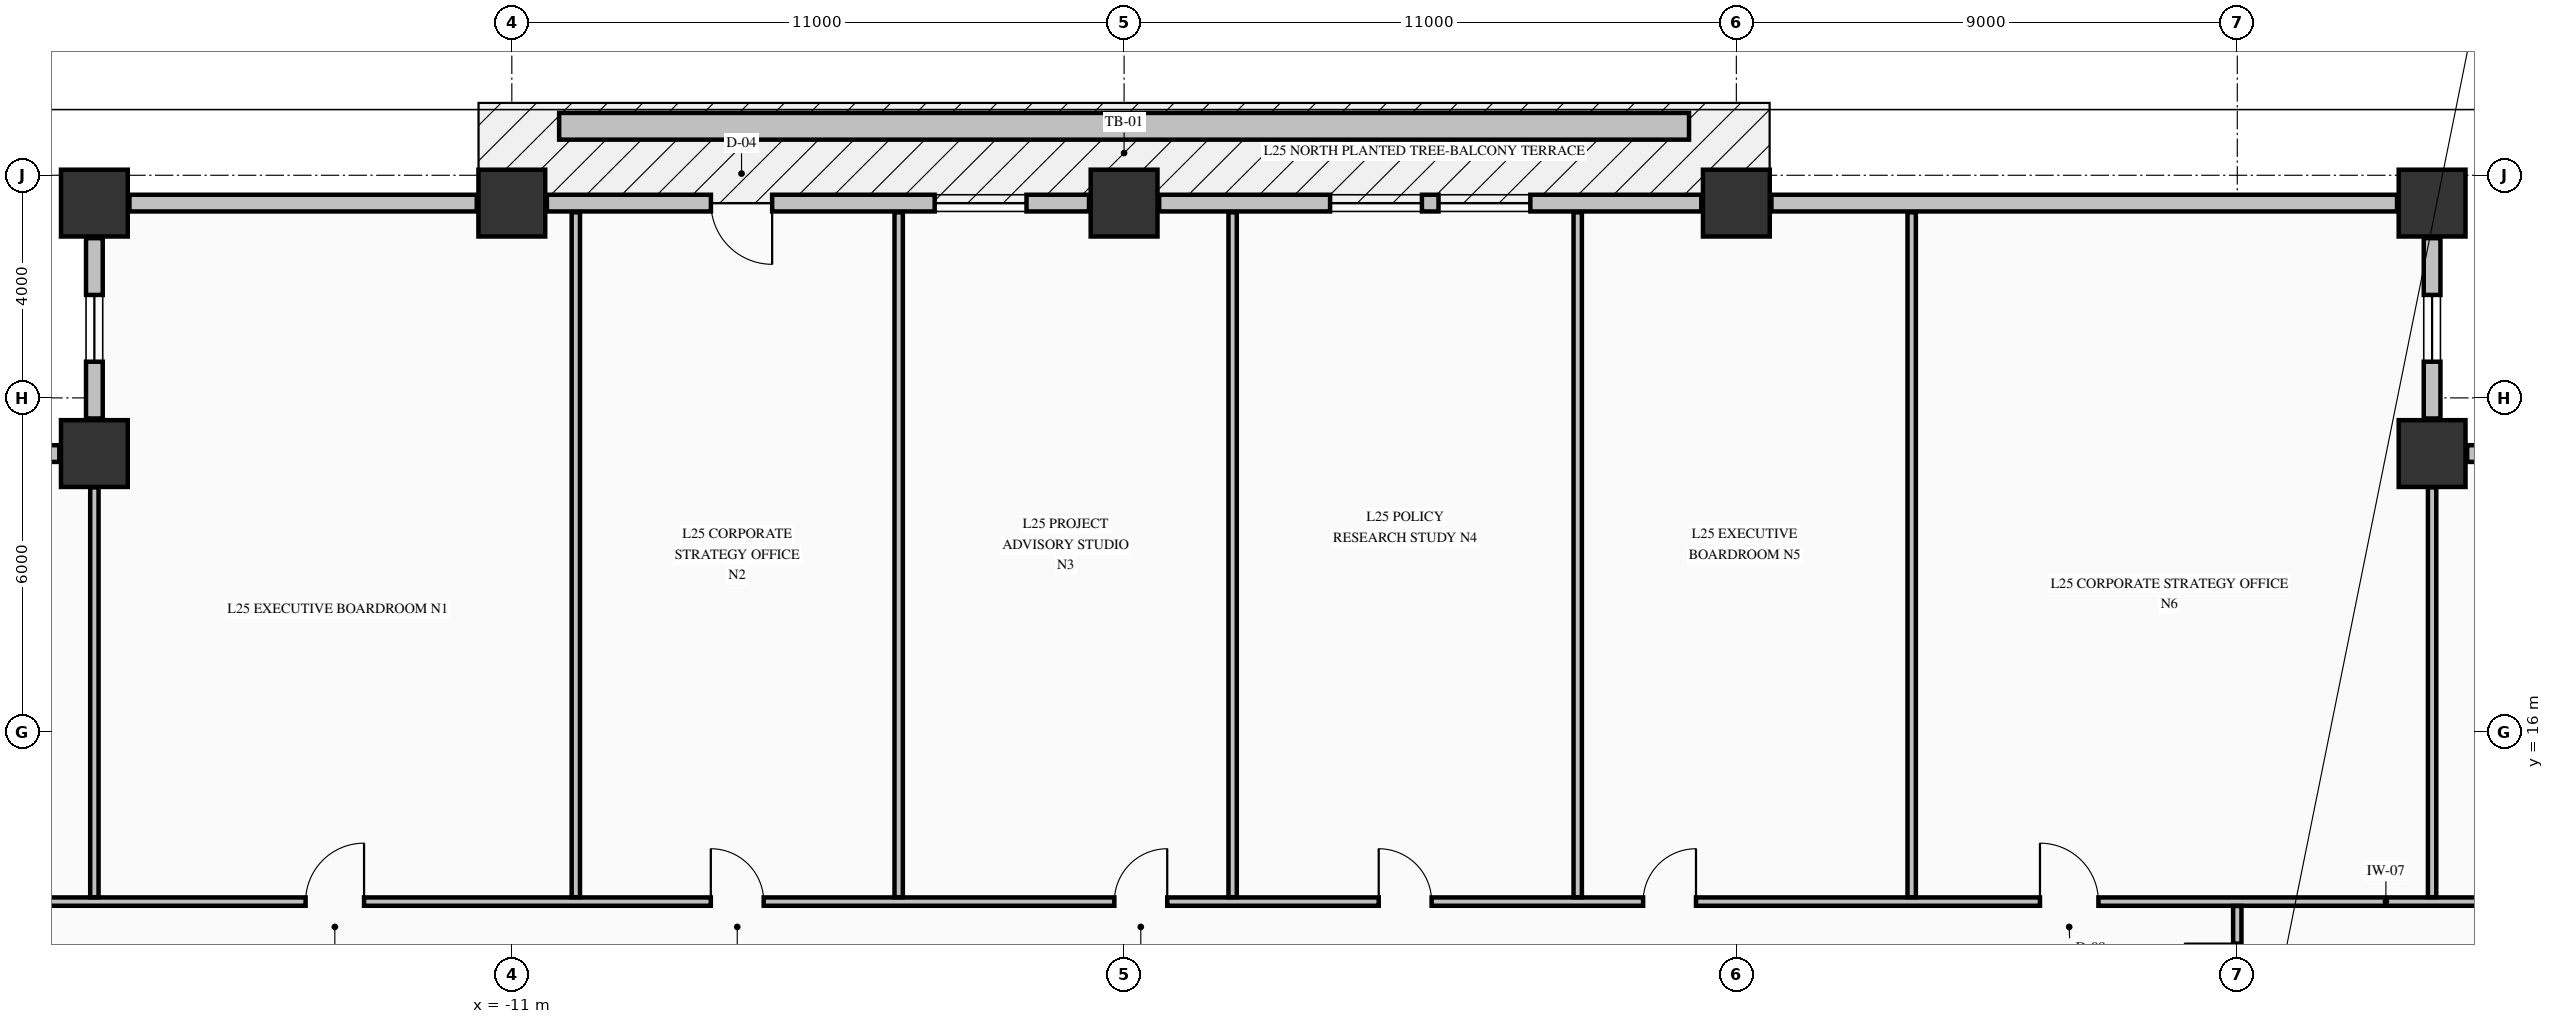
"""IFC4 building model, lengths in metres.
Left out: names, types, materials, properties, quantities, classifications, styles, units other than length and angle.
Written with IfcOpenShell. Run it as: python <this file> out.ifc"""

import sys

from ifc_helpers import new_model, si_unit, direction, frame, frame_2d, origin, origin_2d, place, context, subcontext, project, spatial, rectangle, extrude, element, fill, save


model = new_model("IFC4")
c1 = context("Model", 3, precision=1e-05, world=origin(), true_north=direction((0.0, 1.0)))
c2 = subcontext(c1, "Body", "Model", "MODEL_VIEW")
j1 = project(units=[si_unit("LENGTHUNIT", "METRE"), si_unit("PLANEANGLEUNIT", "RADIAN")], contexts=[c1])
p1 = place(None, origin())
s1 = spatial("IfcSite", under=j1, at=p1, CompositionType="ELEMENT")
p2 = place(p1, origin())
s2 = spatial("IfcBuilding", under=s1, at=p2, CompositionType="ELEMENT")
p3 = place(p2, frame((0.0, 0.0, 102.07)))
s3 = spatial("IfcBuildingStorey", under=s2, at=p3, CompositionType="ELEMENT", Elevation=102.07)
for number, where, z_axis, x_axis in (
    (1, (-18.5, 25.5, -0.25), (0.0, 0.0, 1.0), (1.0, 0.0, 0.0)),
    (2, (-11.0, 25.5, -0.25), (0.0, 0.0, 1.0), (1.0, 0.0, 0.0)),
    (3, (0.0, 25.5, -0.25), (0.0, 0.0, 1.0), (1.0, 0.0, 0.0)),
    (4, (11.0, 25.5, -0.25), (0.0, 0.0, 1.0), (1.0, 0.0, 0.0)),
    (5, (23.5, 25.5, -0.25), (0.0, 0.0, 1.0), (1.0, 0.0, 0.0)),
    (6, (23.5, 21.0, -0.25), (0.0, 0.0, 1.0), (1.0, 0.0, 0.0)),
    (7, (-18.5, 21.0, -0.25), (0.0, 0.0, 1.0), (1.0, 0.0, 0.0)),
):
    element("IfcColumn", number, at=place(p3, frame(where, z_axis=z_axis, x_axis=x_axis)), inside=s3, PredefinedType="COLUMN", context=c2, shape_type="SweptSolid", body=[
        extrude(rectangle(XDim=1.2, YDim=1.2, at=origin_2d()), origin(), (0.0, 0.0, 1.0), 3.57),
    ])
p4 = place(p3, frame((27.37, 21.0, 0.0), z_axis=(0.0, 0.0, 1.0), x_axis=(-1.0, 0.0, 0.0)))
e8 = element("IfcWall", 8, at=p4, inside=s3, PredefinedType="STANDARD", context=c2, shape_type="SweptSolid", body=[
    extrude(rectangle(XDim=3.24, YDim=0.3, at=frame_2d((1.62, 0.0))), origin(), (0.0, 0.0, 1.0), 2.712),
])
p5 = place(p4, frame((1.02, 0.0, 0.82)))
e9 = element("IfcOpeningElement", 9, at=p5, cuts=e8, PredefinedType="OPENING", context=c2, shape_type="SweptSolid", body=[
    extrude(rectangle(XDim=1.2, YDim=1.65, at=frame_2d((0.6, 0.825))), frame((0.0, 0.16, 0.0), z_axis=(0.0, -1.0, 0.0), x_axis=(1.0, 0.0, 0.0)), (0.0, 0.0, 1.0), 0.32),
])
p6 = place(p3, frame((23.5, 21.63, 0.0), z_axis=(0.0, 0.0, 1.0), x_axis=(0.0, 1.0, 0.0)))
e10 = element("IfcWall", 10, at=p6, inside=s3, PredefinedType="STANDARD", context=c2, shape_type="SweptSolid", body=[
    extrude(rectangle(XDim=3.24, YDim=0.3, at=frame_2d((1.62, 0.0))), origin(), (0.0, 0.0, 1.0), 2.712),
])
p7 = place(p6, frame((1.02, 0.0, 0.82)))
e11 = element("IfcOpeningElement", 11, at=p7, cuts=e10, PredefinedType="OPENING", context=c2, shape_type="SweptSolid", body=[
    extrude(rectangle(XDim=1.2, YDim=1.65, at=frame_2d((0.6, 0.825))), frame((0.0, 0.16, 0.0), z_axis=(0.0, -1.0, 0.0), x_axis=(1.0, 0.0, 0.0)), (0.0, 0.0, 1.0), 0.32),
])
p8 = place(p3, frame((-18.5, 24.87, 0.0), z_axis=(0.0, 0.0, 1.0), x_axis=(0.0, -1.0, 0.0)))
e12 = element("IfcWall", 12, at=p8, inside=s3, PredefinedType="STANDARD", context=c2, shape_type="SweptSolid", body=[
    extrude(rectangle(XDim=3.24, YDim=0.3, at=frame_2d((1.62, 0.0))), origin(), (0.0, 0.0, 1.0), 2.712),
])
p9 = place(p8, frame((1.02, 0.0, 0.82)))
e13 = element("IfcOpeningElement", 13, at=p9, cuts=e12, PredefinedType="OPENING", context=c2, shape_type="SweptSolid", body=[
    extrude(rectangle(XDim=1.2, YDim=1.65, at=frame_2d((0.6, 0.825))), frame((0.0, 0.16, 0.0), z_axis=(0.0, -1.0, 0.0), x_axis=(1.0, 0.0, 0.0)), (0.0, 0.0, 1.0), 0.32),
])
p10 = place(p3, frame((-19.13, 21.0, 0.0), z_axis=(0.0, 0.0, 1.0), x_axis=(-1.0, 0.0, 0.0)))
e14 = element("IfcWall", 14, at=p10, inside=s3, PredefinedType="STANDARD", context=c2, shape_type="SweptSolid", body=[
    extrude(rectangle(XDim=3.24, YDim=0.3, at=frame_2d((1.62, 0.0))), origin(), (0.0, 0.0, 1.0), 2.712),
])
p11 = place(p10, frame((1.02, 0.0, 0.82)))
e15 = element("IfcOpeningElement", 15, at=p11, cuts=e14, PredefinedType="OPENING", context=c2, shape_type="SweptSolid", body=[
    extrude(rectangle(XDim=1.2, YDim=1.65, at=frame_2d((0.6, 0.825))), frame((0.0, 0.16, 0.0), z_axis=(0.0, -1.0, 0.0), x_axis=(1.0, 0.0, 0.0)), (0.0, 0.0, 1.0), 0.32),
])
p12 = place(p3, frame((-11.63, 25.5, 0.0), z_axis=(0.0, 0.0, 1.0), x_axis=(-1.0, 0.0, 0.0)))
e16 = element("IfcWall", 16, at=p12, inside=s3, PredefinedType="STANDARD", context=c2, shape_type="SweptSolid", body=[
    extrude(rectangle(XDim=6.24, YDim=0.3, at=frame_2d((3.12, 0.0))), origin(), (0.0, 0.0, 1.0), 2.712),
])
p13 = place(p3, frame((-0.63, 25.5, 0.0), z_axis=(0.0, 0.0, 1.0), x_axis=(-1.0, 0.0, 0.0)))
e17 = element("IfcWall", 17, at=p13, inside=s3, PredefinedType="STANDARD", context=c2, shape_type="SweptSolid", body=[
    extrude(rectangle(XDim=9.74, YDim=0.3, at=frame_2d((4.87, 0.0))), origin(), (0.0, 0.0, 1.0), 2.712),
])
p14 = place(p13, frame((5.693, 0.0, 0.0)))
e18 = element("IfcOpeningElement", 18, at=p14, cuts=e17, PredefinedType="OPENING", context=c2, shape_type="SweptSolid", body=[
    extrude(rectangle(XDim=1.1, YDim=2.15, at=frame_2d((0.55, 1.075))), frame((0.0, 0.16, 0.0), z_axis=(0.0, -1.0, 0.0), x_axis=(1.0, 0.0, 0.0)), (0.0, 0.0, 1.0), 0.32),
])
p15 = place(p13, frame((1.123, 0.0, 0.8)))
e19 = element("IfcOpeningElement", 19, at=p15, cuts=e17, PredefinedType="OPENING", context=c2, shape_type="SweptSolid", body=[
    extrude(rectangle(XDim=1.65, YDim=1.7, at=frame_2d((0.825, 0.85))), frame((0.0, 0.16, 0.0), z_axis=(0.0, -1.0, 0.0), x_axis=(1.0, 0.0, 0.0)), (0.0, 0.0, 1.0), 0.32),
])
p16 = place(p3, frame((10.37, 25.5, 0.0), z_axis=(0.0, 0.0, 1.0), x_axis=(-1.0, 0.0, 0.0)))
e20 = element("IfcWall", 20, at=p16, inside=s3, PredefinedType="STANDARD", context=c2, shape_type="SweptSolid", body=[
    extrude(rectangle(XDim=9.74, YDim=0.3, at=frame_2d((4.87, 0.0))), origin(), (0.0, 0.0, 1.0), 2.712),
])
p17 = place(p16, frame((3.071, 0.0, 0.8)))
e21 = element("IfcOpeningElement", 21, at=p17, cuts=e20, PredefinedType="OPENING", context=c2, shape_type="SweptSolid", body=[
    extrude(rectangle(XDim=1.65, YDim=1.7, at=frame_2d((0.825, 0.85))), frame((0.0, 0.16, 0.0), z_axis=(0.0, -1.0, 0.0), x_axis=(1.0, 0.0, 0.0)), (0.0, 0.0, 1.0), 0.32),
])
p18 = place(p16, frame((5.019, 0.0, 0.8)))
e22 = element("IfcOpeningElement", 22, at=p18, cuts=e20, PredefinedType="OPENING", context=c2, shape_type="SweptSolid", body=[
    extrude(rectangle(XDim=1.65, YDim=1.7, at=frame_2d((0.825, 0.85))), frame((0.0, 0.16, 0.0), z_axis=(0.0, -1.0, 0.0), x_axis=(1.0, 0.0, 0.0)), (0.0, 0.0, 1.0), 0.32),
])
p19 = place(p3, frame((22.87, 25.5, 0.0), z_axis=(0.0, 0.0, 1.0), x_axis=(-1.0, 0.0, 0.0)))
e23 = element("IfcWall", 23, at=p19, inside=s3, PredefinedType="STANDARD", context=c2, shape_type="SweptSolid", body=[
    extrude(rectangle(XDim=11.24, YDim=0.3, at=frame_2d((5.62, 0.0))), origin(), (0.0, 0.0, 1.0), 2.712),
])
p20 = place(p3, frame((-22.835, 12.95, 0.0), z_axis=(0.0, 0.0, 1.0), x_axis=(1.0, 0.0, 0.0)))
e24 = element("IfcWall", 24, at=p20, inside=s3, PredefinedType="PARTITIONING", context=c2, shape_type="SweptSolid", body=[
    extrude(rectangle(XDim=50.67, YDim=0.15, at=frame_2d((25.335, 0.0))), origin(), (0.0, 0.0, 1.0), 3.32),
])
p21 = place(p20, frame((8.13, 0.0, 0.0)))
e25 = element("IfcOpeningElement", 25, at=p21, cuts=e24, PredefinedType="OPENING", context=c2, shape_type="SweptSolid", body=[
    extrude(rectangle(XDim=1.05, YDim=2.15, at=frame_2d((0.525, 1.075))), frame((0.0, 0.085, 0.0), z_axis=(0.0, -1.0, 0.0), x_axis=(1.0, 0.0, 0.0)), (0.0, 0.0, 1.0), 0.17),
])
p22 = place(p20, frame((15.41, 0.0, 0.0)))
e26 = element("IfcOpeningElement", 26, at=p22, cuts=e24, PredefinedType="OPENING", context=c2, shape_type="SweptSolid", body=[
    extrude(rectangle(XDim=0.95, YDim=2.15, at=frame_2d((0.475, 1.075))), frame((0.0, 0.085, 0.0), z_axis=(0.0, -1.0, 0.0), x_axis=(1.0, 0.0, 0.0)), (0.0, 0.0, 1.0), 0.17),
])
p23 = place(p20, frame((22.66, 0.0, 0.0)))
e27 = element("IfcOpeningElement", 27, at=p23, cuts=e24, PredefinedType="OPENING", context=c2, shape_type="SweptSolid", body=[
    extrude(rectangle(XDim=0.95, YDim=2.15, at=frame_2d((0.475, 1.075))), frame((0.0, 0.085, 0.0), z_axis=(0.0, -1.0, 0.0), x_axis=(1.0, 0.0, 0.0)), (0.0, 0.0, 1.0), 0.17),
])
p24 = place(p20, frame((27.41, 0.0, 0.0)))
e28 = element("IfcOpeningElement", 28, at=p24, cuts=e24, PredefinedType="OPENING", context=c2, shape_type="SweptSolid", body=[
    extrude(rectangle(XDim=0.95, YDim=2.15, at=frame_2d((0.475, 1.075))), frame((0.0, 0.085, 0.0), z_axis=(0.0, -1.0, 0.0), x_axis=(1.0, 0.0, 0.0)), (0.0, 0.0, 1.0), 0.17),
])
p25 = place(p20, frame((32.16, 0.0, 0.0)))
e29 = element("IfcOpeningElement", 29, at=p25, cuts=e24, PredefinedType="OPENING", context=c2, shape_type="SweptSolid", body=[
    extrude(rectangle(XDim=0.95, YDim=2.15, at=frame_2d((0.475, 1.075))), frame((0.0, 0.085, 0.0), z_axis=(0.0, -1.0, 0.0), x_axis=(1.0, 0.0, 0.0)), (0.0, 0.0, 1.0), 0.17),
])
p26 = place(p20, frame((39.29, 0.0, 0.0)))
e30 = element("IfcOpeningElement", 30, at=p26, cuts=e24, PredefinedType="OPENING", context=c2, shape_type="SweptSolid", body=[
    extrude(rectangle(XDim=1.05, YDim=2.15, at=frame_2d((0.525, 1.075))), frame((0.0, 0.085, 0.0), z_axis=(0.0, -1.0, 0.0), x_axis=(1.0, 0.0, 0.0)), (0.0, 0.0, 1.0), 0.17),
])
p27 = place(p3, frame((-18.5, 13.028, 0.0), z_axis=(0.0, 0.0, 1.0), x_axis=(0.0, 1.0, 0.0)))
e31 = element("IfcWall", 31, at=p27, inside=s3, PredefinedType="PARTITIONING", context=c2, shape_type="SweptSolid", body=[
    extrude(rectangle(XDim=7.366, YDim=0.15, at=frame_2d((3.683, 0.0))), origin(), (0.0, 0.0, 1.0), 3.32),
])
for number, where, z_axis, x_axis in (
    (32, (-9.85, 13.028, 0.0), (0.0, 0.0, 1.0), (0.0, 1.0, 0.0)),
    (33, (-4.05, 13.028, 0.0), (0.0, 0.0, 1.0), (0.0, 1.0, 0.0)),
    (34, (1.95, 13.028, 0.0), (0.0, 0.0, 1.0), (0.0, 1.0, 0.0)),
    (35, (8.15, 13.028, 0.0), (0.0, 0.0, 1.0), (0.0, 1.0, 0.0)),
    (36, (14.15, 13.028, 0.0), (0.0, 0.0, 1.0), (0.0, 1.0, 0.0)),
):
    element("IfcWall", number, at=place(p3, frame(where, z_axis=z_axis, x_axis=x_axis)), inside=s3, PredefinedType="PARTITIONING", context=c2, shape_type="SweptSolid", body=[
        extrude(rectangle(XDim=12.307, YDim=0.15, at=frame_2d((6.153, 0.0))), origin(), (0.0, 0.0, 1.0), 3.32),
    ])
p28 = place(p3, frame((20.0, 11.006, 0.0), z_axis=(0.0, 0.0, 1.0), x_axis=(0.0, 1.0, 0.0)))
e37 = element("IfcWall", 37, at=p28, inside=s3, PredefinedType="PARTITIONING", context=c2, shape_type="SweptSolid", body=[
    extrude(rectangle(XDim=1.866, YDim=0.15, at=frame_2d((0.933, 0.0))), origin(), (0.0, 0.0, 1.0), 2.81),
])
p29 = place(p28, frame((0.239, 0.0, 0.0)))
e38 = element("IfcOpeningElement", 38, at=p29, cuts=e37, PredefinedType="OPENING", context=c2, shape_type="SweptSolid", body=[
    extrude(rectangle(XDim=0.95, YDim=2.15, at=frame_2d((0.475, 1.075))), frame((0.0, 0.085, 0.0), z_axis=(0.0, -1.0, 0.0), x_axis=(1.0, 0.0, 0.0)), (0.0, 0.0, 1.0), 0.17),
])
p30 = place(p3, frame((23.5, 13.028, 0.0), z_axis=(0.0, 0.0, 1.0), x_axis=(0.0, 1.0, 0.0)))
e39 = element("IfcWall", 39, at=p30, inside=s3, PredefinedType="PARTITIONING", context=c2, shape_type="SweptSolid", body=[
    extrude(rectangle(XDim=7.366, YDim=0.15, at=frame_2d((3.683, 0.0))), origin(), (0.0, 0.0, 1.0), 3.32),
])
p31 = place(p3, frame((-10.15, 26.88, -0.04), z_axis=(0.0, 0.0, 1.0), x_axis=(1.0, 0.0, 0.0)))
e40 = element("IfcWall", 40, at=p31, inside=s3, PredefinedType="PARAPET", context=c2, shape_type="SweptSolid", body=[
    extrude(rectangle(XDim=20.3, YDim=0.48, at=frame_2d((10.15, 0.0))), origin(), (0.0, 0.0, 1.0), 0.52),
])
p32 = place(p7, origin())
e41 = element("IfcWindow", 41, at=p32, inside=s3, PartitioningType="SINGLE_PANEL", PredefinedType="WINDOW", context=c2, shape_type="SweptSolid", body=[
    extrude(rectangle(XDim=1.2, YDim=1.65, at=frame_2d((0.6, 0.825))), frame((0.0, 0.03, 0.0), z_axis=(0.0, -1.0, 0.0), x_axis=(1.0, 0.0, 0.0)), (0.0, 0.0, 1.0), 0.06),
])
fill(e11, e41)
p33 = place(p9, origin())
e42 = element("IfcWindow", 42, at=p33, inside=s3, PartitioningType="SINGLE_PANEL", PredefinedType="WINDOW", context=c2, shape_type="SweptSolid", body=[
    extrude(rectangle(XDim=1.2, YDim=1.65, at=frame_2d((0.6, 0.825))), frame((0.0, 0.03, 0.0), z_axis=(0.0, -1.0, 0.0), x_axis=(1.0, 0.0, 0.0)), (0.0, 0.0, 1.0), 0.06),
])
fill(e13, e42)
p34 = place(p14, origin())
e43 = element("IfcDoor", 43, at=p34, inside=s3, OperationType="SINGLE_SWING_LEFT", PredefinedType="DOOR", context=c2, shape_type="SweptSolid", body=[
    extrude(rectangle(XDim=1.1, YDim=2.15, at=frame_2d((0.55, 1.075))), frame((0.0, 0.025, 0.0), z_axis=(0.0, -1.0, 0.0), x_axis=(1.0, 0.0, 0.0)), (0.0, 0.0, 1.0), 0.05),
])
fill(e18, e43)
p35 = place(p15, origin())
e44 = element("IfcWindow", 44, at=p35, inside=s3, PartitioningType="SINGLE_PANEL", PredefinedType="WINDOW", context=c2, shape_type="SweptSolid", body=[
    extrude(rectangle(XDim=1.65, YDim=1.7, at=frame_2d((0.825, 0.85))), frame((0.0, 0.03, 0.0), z_axis=(0.0, -1.0, 0.0), x_axis=(1.0, 0.0, 0.0)), (0.0, 0.0, 1.0), 0.06),
])
fill(e19, e44)
p36 = place(p17, origin())
e45 = element("IfcWindow", 45, at=p36, inside=s3, PartitioningType="SINGLE_PANEL", PredefinedType="WINDOW", context=c2, shape_type="SweptSolid", body=[
    extrude(rectangle(XDim=1.65, YDim=1.7, at=frame_2d((0.825, 0.85))), frame((0.0, 0.03, 0.0), z_axis=(0.0, -1.0, 0.0), x_axis=(1.0, 0.0, 0.0)), (0.0, 0.0, 1.0), 0.06),
])
fill(e21, e45)
p37 = place(p18, origin())
e46 = element("IfcWindow", 46, at=p37, inside=s3, PartitioningType="SINGLE_PANEL", PredefinedType="WINDOW", context=c2, shape_type="SweptSolid", body=[
    extrude(rectangle(XDim=1.65, YDim=1.7, at=frame_2d((0.825, 0.85))), frame((0.0, 0.03, 0.0), z_axis=(0.0, -1.0, 0.0), x_axis=(1.0, 0.0, 0.0)), (0.0, 0.0, 1.0), 0.06),
])
fill(e22, e46)
p38 = place(p21, origin())
e47 = element("IfcDoor", 47, at=p38, inside=s3, OperationType="SINGLE_SWING_RIGHT", PredefinedType="DOOR", context=c2, shape_type="SweptSolid", body=[
    extrude(rectangle(XDim=1.05, YDim=2.15, at=frame_2d((0.525, 1.075))), frame((0.0, 0.025, 0.0), z_axis=(0.0, -1.0, 0.0), x_axis=(1.0, 0.0, 0.0)), (0.0, 0.0, 1.0), 0.05),
])
fill(e25, e47)
p39 = place(p22, origin())
e48 = element("IfcDoor", 48, at=p39, inside=s3, OperationType="SINGLE_SWING_LEFT", PredefinedType="DOOR", context=c2, shape_type="SweptSolid", body=[
    extrude(rectangle(XDim=0.95, YDim=2.15, at=frame_2d((0.475, 1.075))), frame((0.0, 0.025, 0.0), z_axis=(0.0, -1.0, 0.0), x_axis=(1.0, 0.0, 0.0)), (0.0, 0.0, 1.0), 0.05),
])
fill(e26, e48)
p40 = place(p23, origin())
e49 = element("IfcDoor", 49, at=p40, inside=s3, OperationType="SINGLE_SWING_RIGHT", PredefinedType="DOOR", context=c2, shape_type="SweptSolid", body=[
    extrude(rectangle(XDim=0.95, YDim=2.15, at=frame_2d((0.475, 1.075))), frame((0.0, 0.025, 0.0), z_axis=(0.0, -1.0, 0.0), x_axis=(1.0, 0.0, 0.0)), (0.0, 0.0, 1.0), 0.05),
])
fill(e27, e49)
p41 = place(p24, origin())
e50 = element("IfcDoor", 50, at=p41, inside=s3, OperationType="SINGLE_SWING_LEFT", PredefinedType="DOOR", context=c2, shape_type="SweptSolid", body=[
    extrude(rectangle(XDim=0.95, YDim=2.15, at=frame_2d((0.475, 1.075))), frame((0.0, 0.025, 0.0), z_axis=(0.0, -1.0, 0.0), x_axis=(1.0, 0.0, 0.0)), (0.0, 0.0, 1.0), 0.05),
])
fill(e28, e50)
p42 = place(p25, origin())
e51 = element("IfcDoor", 51, at=p42, inside=s3, OperationType="SINGLE_SWING_RIGHT", PredefinedType="DOOR", context=c2, shape_type="SweptSolid", body=[
    extrude(rectangle(XDim=0.95, YDim=2.15, at=frame_2d((0.475, 1.075))), frame((0.0, 0.025, 0.0), z_axis=(0.0, -1.0, 0.0), x_axis=(1.0, 0.0, 0.0)), (0.0, 0.0, 1.0), 0.05),
])
fill(e29, e51)
p43 = place(p26, origin())
e52 = element("IfcDoor", 52, at=p43, inside=s3, OperationType="SINGLE_SWING_LEFT", PredefinedType="DOOR", context=c2, shape_type="SweptSolid", body=[
    extrude(rectangle(XDim=1.05, YDim=2.15, at=frame_2d((0.525, 1.075))), frame((0.0, 0.025, 0.0), z_axis=(0.0, -1.0, 0.0), x_axis=(1.0, 0.0, 0.0)), (0.0, 0.0, 1.0), 0.05),
])
fill(e30, e52)
p44 = place(p29, origin())
e53 = element("IfcDoor", 53, at=p44, inside=s3, OperationType="SINGLE_SWING_RIGHT", PredefinedType="DOOR", context=c2, shape_type="SweptSolid", body=[
    extrude(rectangle(XDim=0.95, YDim=2.15, at=frame_2d((0.475, 1.075))), frame((0.0, 0.025, 0.0), z_axis=(0.0, -1.0, 0.0), x_axis=(1.0, 0.0, 0.0)), (0.0, 0.0, 1.0), 0.05),
])
fill(e38, e53)
save(model, sys.argv[1])
